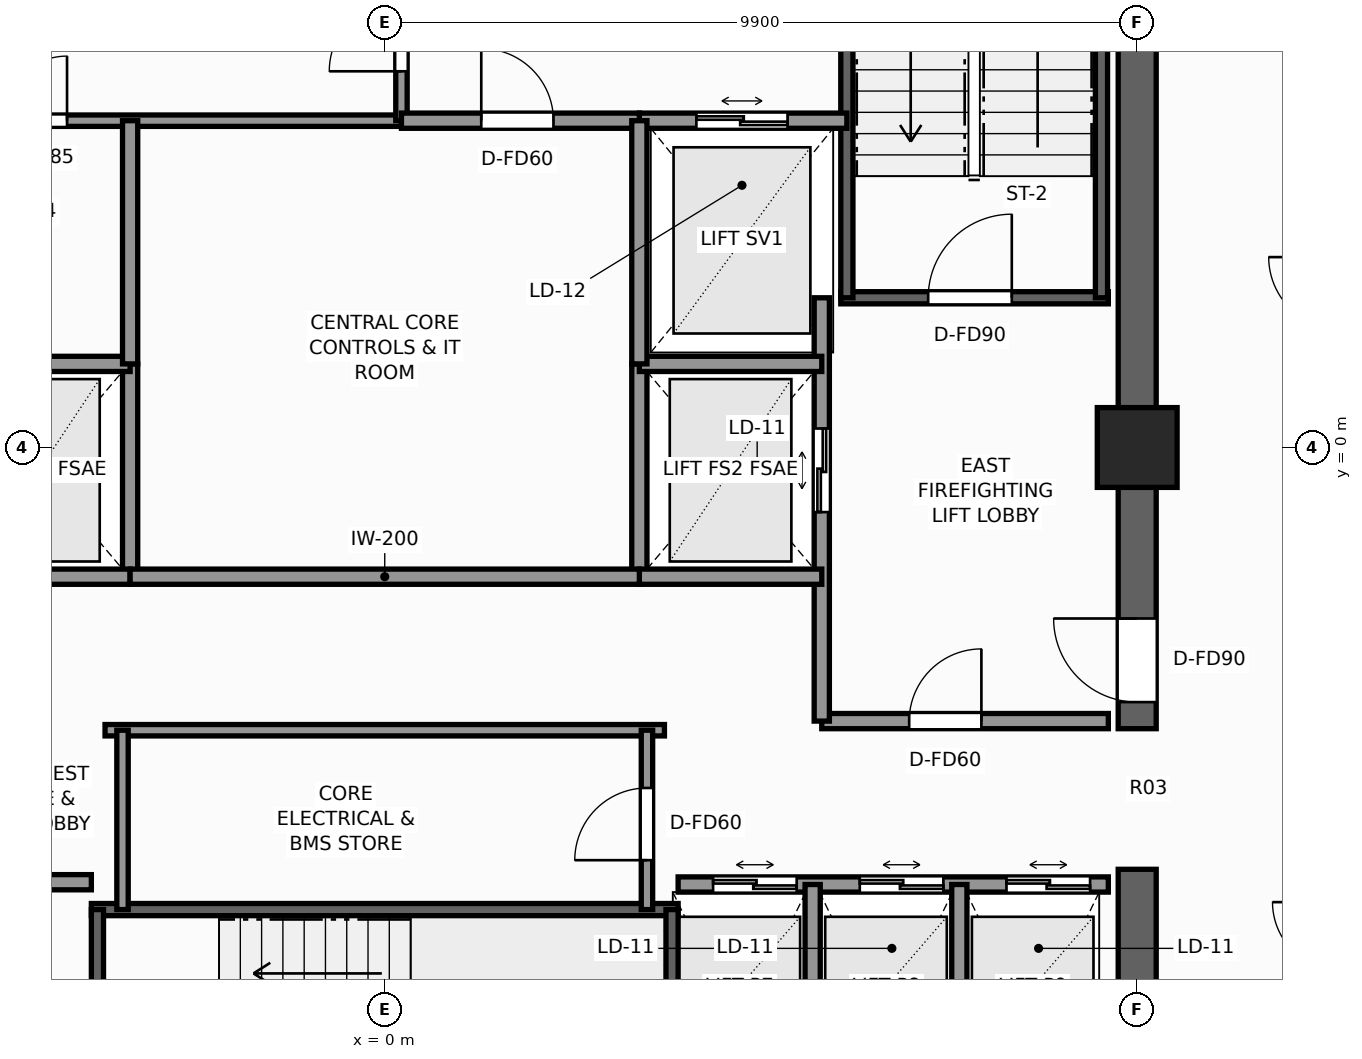
"""IFC4 building model, lengths in metres.
Left out: names, types, materials, properties, quantities, classifications, styles, units other than length and angle.
Written with IfcOpenShell. Run it as: python <this file> out.ifc"""

import sys

from ifc_helpers import new_model, si_unit, direction, frame, frame_2d, origin, origin_2d, place, context, subcontext, project, spatial, rectangle, extrude, element, fill, save


model = new_model("IFC4")
c1 = context("Model", 3, precision=1e-05, world=origin(), true_north=direction((0.0, 1.0)))
c2 = subcontext(c1, "Body", "Model", "MODEL_VIEW")
j1 = project(units=[si_unit("LENGTHUNIT", "METRE"), si_unit("PLANEANGLEUNIT", "RADIAN")], contexts=[c1])
p1 = place(None, origin())
s1 = spatial("IfcSite", under=j1, at=p1, CompositionType="ELEMENT")
p2 = place(p1, origin())
s2 = spatial("IfcBuilding", under=s1, at=p2, CompositionType="ELEMENT")
p3 = place(p2, frame((0.0, 0.0, 203.1)))
s3 = spatial("IfcBuildingStorey", under=s2, at=p3, CompositionType="ELEMENT", Elevation=203.1)
p4 = place(p3, frame((9.9, -9.65, 0.0), z_axis=(0.0, 0.0, 1.0), x_axis=(0.0, 1.0, 0.0)))
e1 = element("IfcWall", 1, at=p4, inside=s3, PredefinedType="SHEAR", context=c2, shape_type="SweptSolid", body=[
    extrude(rectangle(XDim=4.1, YDim=0.5, at=frame_2d((2.05, 0.0))), origin(), (0.0, 0.0, 1.0), 3.3),
])
p5 = place(p3, frame((9.9, -3.7, 0.0), z_axis=(0.0, 0.0, 1.0), x_axis=(0.0, 1.0, 0.0)))
e2 = element("IfcWall", 2, at=p5, inside=s3, PredefinedType="SHEAR", context=c2, shape_type="SweptSolid", body=[
    extrude(rectangle(XDim=13.35, YDim=0.5, at=frame_2d((6.675, 0.0))), origin(), (0.0, 0.0, 1.0), 3.3),
])
p6 = place(p5, frame((0.35, 0.0, 0.0)))
e3 = element("IfcOpeningElement", 3, at=p6, cuts=e2, PredefinedType="OPENING", context=c2, shape_type="SweptSolid", body=[
    extrude(rectangle(XDim=1.1, YDim=2.2, at=frame_2d((0.55, 1.1))), frame((0.0, 0.26, 0.0), z_axis=(0.0, -1.0, 0.0), x_axis=(1.0, 0.0, 0.0)), (0.0, 0.0, 1.0), 0.52),
])
p7 = place(p3, frame((9.9, 0.0, 0.0), z_axis=(0.0, 0.0, 1.0), x_axis=(1.0, 0.0, 0.0)))
e4 = element("IfcColumn", 4, at=p7, inside=s3, PredefinedType="COLUMN", context=c2, shape_type="SweptSolid", body=[
    extrude(rectangle(XDim=1.05, YDim=1.05, at=origin_2d()), origin(), (0.0, 0.0, 1.0), 3.3),
])
p8 = place(p3, frame((6.0, 1.97, 0.0), z_axis=(0.0, 0.0, 1.0), x_axis=(1.0, 0.0, 0.0)))
e5 = element("IfcWall", 5, at=p8, inside=s3, PredefinedType="SHEAR", context=c2, shape_type="SweptSolid", body=[
    extrude(rectangle(XDim=3.52, YDim=0.16, at=frame_2d((1.76, 0.0))), origin(), (0.0, 0.0, 1.0), 3.3),
])
p9 = place(p8, frame((1.15, 0.0, 0.0)))
e6 = element("IfcOpeningElement", 6, at=p9, cuts=e5, PredefinedType="OPENING", context=c2, shape_type="SweptSolid", body=[
    extrude(rectangle(XDim=1.1, YDim=2.2, at=frame_2d((0.55, 1.1))), frame((0.0, 0.09, 0.0), z_axis=(0.0, -1.0, 0.0), x_axis=(1.0, 0.0, 0.0)), (0.0, 0.0, 1.0), 0.18),
])
for number, where, z_axis, x_axis in (
    (7, (6.08, 1.97, 0.0), (0.0, 0.0, 1.0), (0.0, 1.0, 0.0)),
    (8, (9.43, 1.97, 0.0), (0.0, 0.0, 1.0), (0.0, 1.0, 0.0)),
):
    element("IfcWall", number, at=place(p3, frame(where, z_axis=z_axis, x_axis=x_axis)), inside=s3, PredefinedType="SHEAR", context=c2, shape_type="SweptSolid", body=[
        extrude(rectangle(XDim=7.56, YDim=0.16, at=frame_2d((3.78, 0.0))), origin(), (0.0, 0.0, 1.0), 3.3),
    ])
p10 = place(p3, frame((-3.86, -6.08, 0.0), z_axis=(0.0, 0.0, 1.0), x_axis=(1.0, 0.0, 0.0)))
e9 = element("IfcWall", 9, at=p10, inside=s3, PredefinedType="SHEAR", context=c2, shape_type="SweptSolid", body=[
    extrude(rectangle(XDim=7.72, YDim=0.16, at=frame_2d((3.86, 0.0))), origin(), (0.0, 0.0, 1.0), 3.3),
])
for number, where, z_axis, x_axis in (
    (10, (-3.78, -9.43, 0.0), (0.0, 0.0, 1.0), (0.0, 1.0, 0.0)),
    (11, (3.78, -9.43, 0.0), (0.0, 0.0, 1.0), (0.0, 1.0, 0.0)),
):
    element("IfcWall", number, at=place(p3, frame(where, z_axis=z_axis, x_axis=x_axis)), inside=s3, PredefinedType="SHEAR", context=c2, shape_type="SweptSolid", body=[
        extrude(rectangle(XDim=3.35, YDim=0.16, at=frame_2d((1.675, 0.0))), origin(), (0.0, 0.0, 1.0), 3.3),
    ])
p11 = place(p3, frame((-3.35, -1.7, 0.0), z_axis=(0.0, 0.0, 1.0), x_axis=(0.0, 1.0, 0.0)))
e12 = element("IfcWall", 12, at=p11, inside=s3, PredefinedType="SOLIDWALL", context=c2, shape_type="SweptSolid", body=[
    extrude(rectangle(XDim=2.8, YDim=0.2, at=frame_2d((1.4, 0.0))), origin(), (0.0, 0.0, 1.0), 3.08),
])
for number, where, z_axis, x_axis in (
    (13, (-5.75, -1.7, 0.0), (0.0, 0.0, 1.0), (1.0, 0.0, 0.0)),
    (14, (-5.75, 1.1, 0.0), (0.0, 0.0, 1.0), (1.0, 0.0, 0.0)),
):
    element("IfcWall", number, at=place(p3, frame(where, z_axis=z_axis, x_axis=x_axis)), inside=s3, PredefinedType="SOLIDWALL", context=c2, shape_type="SweptSolid", body=[
        extrude(rectangle(XDim=2.4, YDim=0.2, at=frame_2d((1.2, 0.0))), origin(), (0.0, 0.0, 1.0), 3.08),
    ])
p12 = place(p3, frame((5.75, -3.6, 0.0), z_axis=(0.0, 0.0, 1.0), x_axis=(1.0, 0.0, 0.0)))
e15 = element("IfcWall", 15, at=p12, inside=s3, PredefinedType="SOLIDWALL", context=c2, shape_type="SweptSolid", body=[
    extrude(rectangle(XDim=3.77, YDim=0.2, at=frame_2d((1.885, 0.0))), origin(), (0.0, 0.0, 1.0), 3.08),
])
p13 = place(p12, frame((1.15, 0.0, 0.0)))
e16 = element("IfcOpeningElement", 16, at=p13, cuts=e15, PredefinedType="OPENING", context=c2, shape_type="SweptSolid", body=[
    extrude(rectangle(XDim=0.95, YDim=2.06, at=frame_2d((0.475, 1.03))), frame((0.0, 0.11, 0.0), z_axis=(0.0, -1.0, 0.0), x_axis=(1.0, 0.0, 0.0)), (0.0, 0.0, 1.0), 0.22),
])
p14 = place(p3, frame((5.75, -3.6, 0.0), z_axis=(0.0, 0.0, 1.0), x_axis=(0.0, 1.0, 0.0)))
e17 = element("IfcWall", 17, at=p14, inside=s3, PredefinedType="SOLIDWALL", context=c2, shape_type="SweptSolid", body=[
    extrude(rectangle(XDim=5.57, YDim=0.2, at=frame_2d((2.785, 0.0))), origin(), (0.0, 0.0, 1.0), 3.08),
])
p15 = place(p14, frame((2.75, 0.0, 0.0)))
e18 = element("IfcOpeningElement", 18, at=p15, cuts=e17, PredefinedType="OPENING", context=c2, shape_type="SweptSolid", body=[
    extrude(rectangle(XDim=1.1, YDim=2.2, at=frame_2d((0.55, 1.1))), frame((0.0, 0.11, 0.0), z_axis=(0.0, -1.0, 0.0), x_axis=(1.0, 0.0, 0.0)), (0.0, 0.0, 1.0), 0.22),
])
p16 = place(p3, frame((3.35, -1.7, 0.0), z_axis=(0.0, 0.0, 1.0), x_axis=(0.0, 1.0, 0.0)))
e19 = element("IfcWall", 19, at=p16, inside=s3, PredefinedType="SOLIDWALL", context=c2, shape_type="SweptSolid", body=[
    extrude(rectangle(XDim=2.8, YDim=0.2, at=frame_2d((1.4, 0.0))), origin(), (0.0, 0.0, 1.0), 3.08),
])
for number, where, z_axis, x_axis in (
    (20, (3.35, -1.7, 0.0), (0.0, 0.0, 1.0), (1.0, 0.0, 0.0)),
    (21, (3.35, 1.1, 0.0), (0.0, 0.0, 1.0), (1.0, 0.0, 0.0)),
):
    element("IfcWall", number, at=place(p3, frame(where, z_axis=z_axis, x_axis=x_axis)), inside=s3, PredefinedType="SOLIDWALL", context=c2, shape_type="SweptSolid", body=[
        extrude(rectangle(XDim=2.4, YDim=0.2, at=frame_2d((1.2, 0.0))), origin(), (0.0, 0.0, 1.0), 3.08),
    ])
p17 = place(p3, frame((3.35, 4.3, 0.0), z_axis=(0.0, 0.0, 1.0), x_axis=(1.0, 0.0, 0.0)))
e22 = element("IfcWall", 22, at=p17, inside=s3, PredefinedType="SOLIDWALL", context=c2, shape_type="SweptSolid", body=[
    extrude(rectangle(XDim=2.73, YDim=0.2, at=frame_2d((1.365, 0.0))), origin(), (0.0, 0.0, 1.0), 3.08),
])
p18 = place(p17, frame((0.75, 0.0, 0.0)))
e23 = element("IfcOpeningElement", 23, at=p18, cuts=e22, PredefinedType="OPENING", context=c2, shape_type="SweptSolid", body=[
    extrude(rectangle(XDim=1.2, YDim=2.25, at=frame_2d((0.6, 1.125))), frame((0.0, 0.11, 0.0), z_axis=(0.0, -1.0, 0.0), x_axis=(1.0, 0.0, 0.0)), (0.0, 0.0, 1.0), 0.22),
])
p19 = place(p3, frame((-6.08, 4.3, 0.0), z_axis=(0.0, 0.0, 1.0), x_axis=(1.0, 0.0, 0.0)))
e24 = element("IfcWall", 24, at=p19, inside=s3, PredefinedType="PARTITIONING", context=c2, shape_type="SweptSolid", body=[
    extrude(rectangle(XDim=6.3, YDim=0.15, at=frame_2d((3.15, 0.0))), origin(), (0.0, 0.0, 1.0), 3.08),
])
p20 = place(p19, frame((1.05, 0.0, 0.0)))
e25 = element("IfcOpeningElement", 25, at=p20, cuts=e24, PredefinedType="OPENING", context=c2, shape_type="SweptSolid", body=[
    extrude(rectangle(XDim=0.85, YDim=2.03, at=frame_2d((0.425, 1.015))), frame((0.0, 0.085, 0.0), z_axis=(0.0, -1.0, 0.0), x_axis=(1.0, 0.0, 0.0)), (0.0, 0.0, 1.0), 0.17),
])
p21 = place(p3, frame((0.22, 4.3, 0.0), z_axis=(0.0, 0.0, 1.0), x_axis=(0.0, 1.0, 0.0)))
e26 = element("IfcWall", 26, at=p21, inside=s3, PredefinedType="PARTITIONING", context=c2, shape_type="SweptSolid", body=[
    extrude(rectangle(XDim=5.22, YDim=0.15, at=frame_2d((2.61, 0.0))), origin(), (0.0, 0.0, 1.0), 3.08),
])
p22 = place(p21, frame((0.65, 0.0, 0.0)))
e27 = element("IfcOpeningElement", 27, at=p22, cuts=e26, PredefinedType="OPENING", context=c2, shape_type="SweptSolid", body=[
    extrude(rectangle(XDim=0.95, YDim=2.06, at=frame_2d((0.475, 1.03))), frame((0.0, 0.085, 0.0), z_axis=(0.0, -1.0, 0.0), x_axis=(1.0, 0.0, 0.0)), (0.0, 0.0, 1.0), 0.17),
])
p23 = place(p3, frame((-9.52, -5.72, 0.0), z_axis=(0.0, 0.0, 1.0), x_axis=(1.0, 0.0, 0.0)))
e28 = element("IfcWall", 28, at=p23, inside=s3, PredefinedType="SOLIDWALL", context=c2, shape_type="SweptSolid", body=[
    extrude(rectangle(XDim=5.66, YDim=0.2, at=frame_2d((2.83, 0.0))), origin(), (0.0, 0.0, 1.0), 3.08),
])
p24 = place(p23, frame((1.8, 0.0, 0.0)))
e29 = element("IfcOpeningElement", 29, at=p24, cuts=e28, PredefinedType="OPENING", context=c2, shape_type="SweptSolid", body=[
    extrude(rectangle(XDim=0.95, YDim=2.06, at=frame_2d((0.475, 1.03))), frame((0.0, 0.11, 0.0), z_axis=(0.0, -1.0, 0.0), x_axis=(1.0, 0.0, 0.0)), (0.0, 0.0, 1.0), 0.22),
])
p25 = place(p3, frame((3.86, -5.75, 0.0), z_axis=(0.0, 0.0, 1.0), x_axis=(1.0, 0.0, 0.0)))
e30 = element("IfcWall", 30, at=p25, inside=s3, PredefinedType="SOLIDWALL", context=c2, shape_type="SweptSolid", body=[
    extrude(rectangle(XDim=5.66, YDim=0.2, at=frame_2d((2.83, 0.0))), origin(), (0.0, 0.0, 1.0), 3.08),
])
p26 = place(p25, frame((0.46, 0.0, 0.0)))
e31 = element("IfcOpeningElement", 31, at=p26, cuts=e30, PredefinedType="OPENING", context=c2, shape_type="SweptSolid", body=[
    extrude(rectangle(XDim=1.1, YDim=2.2, at=frame_2d((0.55, 1.1))), frame((0.0, 0.11, 0.0), z_axis=(0.0, -1.0, 0.0), x_axis=(1.0, 0.0, 0.0)), (0.0, 0.0, 1.0), 0.22),
])
p27 = place(p25, frame((2.39, 0.0, 0.0)))
e32 = element("IfcOpeningElement", 32, at=p27, cuts=e30, PredefinedType="OPENING", context=c2, shape_type="SweptSolid", body=[
    extrude(rectangle(XDim=1.1, YDim=2.2, at=frame_2d((0.55, 1.1))), frame((0.0, 0.11, 0.0), z_axis=(0.0, -1.0, 0.0), x_axis=(1.0, 0.0, 0.0)), (0.0, 0.0, 1.0), 0.22),
])
p28 = place(p25, frame((4.32, 0.0, 0.0)))
e33 = element("IfcOpeningElement", 33, at=p28, cuts=e30, PredefinedType="OPENING", context=c2, shape_type="SweptSolid", body=[
    extrude(rectangle(XDim=1.1, YDim=2.2, at=frame_2d((0.55, 1.1))), frame((0.0, 0.11, 0.0), z_axis=(0.0, -1.0, 0.0), x_axis=(1.0, 0.0, 0.0)), (0.0, 0.0, 1.0), 0.22),
])
for number, where, z_axis, x_axis in (
    (34, (5.63, -9.52, 0.0), (0.0, 0.0, 1.0), (0.0, 1.0, 0.0)),
    (35, (7.56, -9.52, 0.0), (0.0, 0.0, 1.0), (0.0, 1.0, 0.0)),
):
    element("IfcWall", number, at=place(p3, frame(where, z_axis=z_axis, x_axis=x_axis)), inside=s3, PredefinedType="SOLIDWALL", context=c2, shape_type="SweptSolid", body=[
        extrude(rectangle(XDim=3.77, YDim=0.2, at=frame_2d((1.885, 0.0))), origin(), (0.0, 0.0, 1.0), 3.08),
    ])
p29 = place(p3, frame((0.22, 4.3, 0.0), z_axis=(0.0, 0.0, 1.0), x_axis=(1.0, 0.0, 0.0)))
e36 = element("IfcWall", 36, at=p29, inside=s3, PredefinedType="SOLIDWALL", context=c2, shape_type="SweptSolid", body=[
    extrude(rectangle(XDim=3.13, YDim=0.2, at=frame_2d((1.565, 0.0))), origin(), (0.0, 0.0, 1.0), 3.08),
])
p30 = place(p29, frame((1.05, 0.0, 0.0)))
e37 = element("IfcOpeningElement", 37, at=p30, cuts=e36, PredefinedType="OPENING", context=c2, shape_type="SweptSolid", body=[
    extrude(rectangle(XDim=0.95, YDim=2.06, at=frame_2d((0.475, 1.03))), frame((0.0, 0.11, 0.0), z_axis=(0.0, -1.0, 0.0), x_axis=(1.0, 0.0, 0.0)), (0.0, 0.0, 1.0), 0.22),
])
p31 = place(p3, frame((-3.35, -1.7, 0.0), z_axis=(0.0, 0.0, 1.0), x_axis=(1.0, 0.0, 0.0)))
e38 = element("IfcWall", 38, at=p31, inside=s3, PredefinedType="SOLIDWALL", context=c2, shape_type="SweptSolid", body=[
    extrude(rectangle(XDim=6.7, YDim=0.2, at=frame_2d((3.35, 0.0))), origin(), (0.0, 0.0, 1.0), 3.08),
])
for number, where, z_axis, x_axis in (
    (39, (-3.35, 1.1, 0.0), (0.0, 0.0, 1.0), (0.0, 1.0, 0.0)),
    (40, (3.35, 1.1, 0.0), (0.0, 0.0, 1.0), (0.0, 1.0, 0.0)),
):
    element("IfcWall", number, at=place(p3, frame(where, z_axis=z_axis, x_axis=x_axis)), inside=s3, PredefinedType="SOLIDWALL", context=c2, shape_type="SweptSolid", body=[
        extrude(rectangle(XDim=3.2, YDim=0.2, at=frame_2d((1.6, 0.0))), origin(), (0.0, 0.0, 1.0), 3.08),
    ])
p32 = place(p3, frame((-3.68, -3.72, 0.0), z_axis=(0.0, 0.0, 1.0), x_axis=(1.0, 0.0, 0.0)))
e41 = element("IfcWall", 41, at=p32, inside=s3, PredefinedType="PARTITIONING", context=c2, shape_type="SweptSolid", body=[
    extrude(rectangle(XDim=7.36, YDim=0.15, at=frame_2d((3.68, 0.0))), origin(), (0.0, 0.0, 1.0), 3.08),
])
p33 = place(p3, frame((3.45, -6.08, 0.0), z_axis=(0.0, 0.0, 1.0), x_axis=(0.0, 1.0, 0.0)))
e42 = element("IfcWall", 42, at=p33, inside=s3, PredefinedType="PARTITIONING", context=c2, shape_type="SweptSolid", body=[
    extrude(rectangle(XDim=2.36, YDim=0.15, at=frame_2d((1.18, 0.0))), origin(), (0.0, 0.0, 1.0), 3.08),
])
p34 = place(p33, frame((0.65, 0.0, 0.0)))
e43 = element("IfcOpeningElement", 43, at=p34, cuts=e42, PredefinedType="OPENING", context=c2, shape_type="SweptSolid", body=[
    extrude(rectangle(XDim=0.95, YDim=2.06, at=frame_2d((0.475, 1.03))), frame((0.0, 0.085, 0.0), z_axis=(0.0, -1.0, 0.0), x_axis=(1.0, 0.0, 0.0)), (0.0, 0.0, 1.0), 0.17),
])
p35 = place(p3, frame((-3.45, -6.08, 0.0), z_axis=(0.0, 0.0, 1.0), x_axis=(0.0, 1.0, 0.0)))
e44 = element("IfcWall", 44, at=p35, inside=s3, PredefinedType="PARTITIONING", context=c2, shape_type="SweptSolid", body=[
    extrude(rectangle(XDim=2.36, YDim=0.15, at=frame_2d((1.18, 0.0))), origin(), (0.0, 0.0, 1.0), 3.08),
])
p36 = place(p9, origin())
e45 = element("IfcDoor", 45, at=p36, inside=s3, OperationType="SINGLE_SWING_RIGHT", PredefinedType="DOOR", context=c2, shape_type="SweptSolid", body=[
    extrude(rectangle(XDim=1.1, YDim=2.2, at=frame_2d((0.55, 1.1))), frame((0.0, 0.025, 0.0), z_axis=(0.0, -1.0, 0.0), x_axis=(1.0, 0.0, 0.0)), (0.0, 0.0, 1.0), 0.05),
])
fill(e6, e45)
p37 = place(p6, origin())
e46 = element("IfcDoor", 46, at=p37, inside=s3, OperationType="SINGLE_SWING_RIGHT", PredefinedType="DOOR", context=c2, shape_type="SweptSolid", body=[
    extrude(rectangle(XDim=1.1, YDim=2.2, at=frame_2d((0.55, 1.1))), frame((0.0, 0.025, 0.0), z_axis=(0.0, -1.0, 0.0), x_axis=(1.0, 0.0, 0.0)), (0.0, 0.0, 1.0), 0.05),
])
fill(e3, e46)
p38 = place(p15, origin())
e47 = element("IfcDoor", 47, at=p38, inside=s3, OperationType="DOUBLE_DOOR_SLIDING", PredefinedType="DOOR", context=c2, shape_type="SweptSolid", body=[
    extrude(rectangle(XDim=1.1, YDim=2.2, at=frame_2d((0.55, 1.1))), frame((0.0, 0.025, 0.0), z_axis=(0.0, -1.0, 0.0), x_axis=(1.0, 0.0, 0.0)), (0.0, 0.0, 1.0), 0.05),
])
fill(e18, e47)
p39 = place(p18, origin())
e48 = element("IfcDoor", 48, at=p39, inside=s3, OperationType="DOUBLE_DOOR_SLIDING", PredefinedType="DOOR", context=c2, shape_type="SweptSolid", body=[
    extrude(rectangle(XDim=1.2, YDim=2.25, at=frame_2d((0.6, 1.125))), frame((0.0, 0.025, 0.0), z_axis=(0.0, -1.0, 0.0), x_axis=(1.0, 0.0, 0.0)), (0.0, 0.0, 1.0), 0.05),
])
fill(e23, e48)
p40 = place(p22, origin())
e49 = element("IfcDoor", 49, at=p40, inside=s3, OperationType="SINGLE_SWING_LEFT", PredefinedType="DOOR", context=c2, shape_type="SweptSolid", body=[
    extrude(rectangle(XDim=0.95, YDim=2.06, at=frame_2d((0.475, 1.03))), frame((0.0, 0.025, 0.0), z_axis=(0.0, -1.0, 0.0), x_axis=(1.0, 0.0, 0.0)), (0.0, 0.0, 1.0), 0.05),
])
fill(e27, e49)
p41 = place(p26, origin())
e50 = element("IfcDoor", 50, at=p41, inside=s3, OperationType="DOUBLE_DOOR_SLIDING", PredefinedType="DOOR", context=c2, shape_type="SweptSolid", body=[
    extrude(rectangle(XDim=1.1, YDim=2.2, at=frame_2d((0.55, 1.1))), frame((0.0, 0.025, 0.0), z_axis=(0.0, -1.0, 0.0), x_axis=(1.0, 0.0, 0.0)), (0.0, 0.0, 1.0), 0.05),
])
fill(e31, e50)
p42 = place(p27, origin())
e51 = element("IfcDoor", 51, at=p42, inside=s3, OperationType="DOUBLE_DOOR_SLIDING", PredefinedType="DOOR", context=c2, shape_type="SweptSolid", body=[
    extrude(rectangle(XDim=1.1, YDim=2.2, at=frame_2d((0.55, 1.1))), frame((0.0, 0.025, 0.0), z_axis=(0.0, -1.0, 0.0), x_axis=(1.0, 0.0, 0.0)), (0.0, 0.0, 1.0), 0.05),
])
fill(e32, e51)
p43 = place(p28, origin())
e52 = element("IfcDoor", 52, at=p43, inside=s3, OperationType="DOUBLE_DOOR_SLIDING", PredefinedType="DOOR", context=c2, shape_type="SweptSolid", body=[
    extrude(rectangle(XDim=1.1, YDim=2.2, at=frame_2d((0.55, 1.1))), frame((0.0, 0.025, 0.0), z_axis=(0.0, -1.0, 0.0), x_axis=(1.0, 0.0, 0.0)), (0.0, 0.0, 1.0), 0.05),
])
fill(e33, e52)
p44 = place(p13, origin())
e53 = element("IfcDoor", 53, at=p44, inside=s3, OperationType="SINGLE_SWING_RIGHT", PredefinedType="DOOR", context=c2, shape_type="SweptSolid", body=[
    extrude(rectangle(XDim=0.95, YDim=2.06, at=frame_2d((0.475, 1.03))), frame((0.0, 0.025, 0.0), z_axis=(0.0, -1.0, 0.0), x_axis=(1.0, 0.0, 0.0)), (0.0, 0.0, 1.0), 0.05),
])
fill(e16, e53)
p45 = place(p30, origin())
e54 = element("IfcDoor", 54, at=p45, inside=s3, OperationType="SINGLE_SWING_LEFT", PredefinedType="DOOR", context=c2, shape_type="SweptSolid", body=[
    extrude(rectangle(XDim=0.95, YDim=2.06, at=frame_2d((0.475, 1.03))), frame((0.0, 0.025, 0.0), z_axis=(0.0, -1.0, 0.0), x_axis=(1.0, 0.0, 0.0)), (0.0, 0.0, 1.0), 0.05),
])
fill(e37, e54)
p46 = place(p34, origin())
e55 = element("IfcDoor", 55, at=p46, inside=s3, OperationType="SINGLE_SWING_LEFT", PredefinedType="DOOR", context=c2, shape_type="SweptSolid", body=[
    extrude(rectangle(XDim=0.95, YDim=2.06, at=frame_2d((0.475, 1.03))), frame((0.0, 0.025, 0.0), z_axis=(0.0, -1.0, 0.0), x_axis=(1.0, 0.0, 0.0)), (0.0, 0.0, 1.0), 0.05),
])
fill(e43, e55)
p47 = place(p20, origin())
e56 = element("IfcDoor", 56, at=p47, inside=s3, OperationType="SINGLE_SWING_RIGHT", PredefinedType="DOOR", context=c2, shape_type="SweptSolid", body=[
    extrude(rectangle(XDim=0.85, YDim=2.03, at=frame_2d((0.425, 1.015))), frame((0.0, 0.025, 0.0), z_axis=(0.0, -1.0, 0.0), x_axis=(1.0, 0.0, 0.0)), (0.0, 0.0, 1.0), 0.05),
])
fill(e25, e56)
save(model, sys.argv[1])
